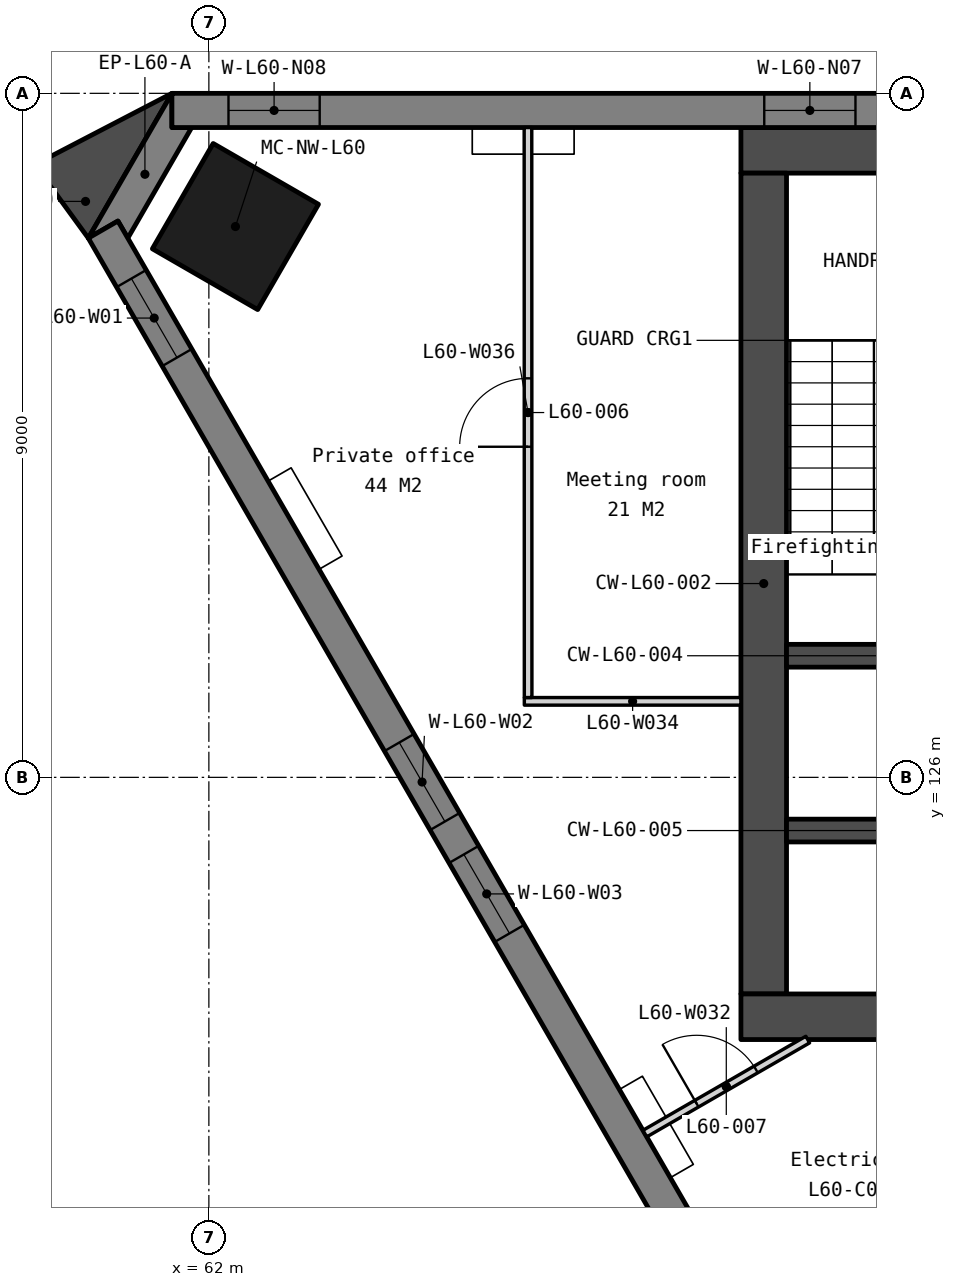
"""IFC4 building model, lengths in metres.
Left out: names, types, materials, properties, quantities, classifications, styles, units other than length and angle.
Written with IfcOpenShell. Run it as: python <this file> out.ifc"""

import sys

from ifc_helpers import new_model, si_unit, direction, frame, frame_2d, origin, origin_2d, place, context, subcontext, project, spatial, polyline, rectangle, outline, extrude, element, fill, save


model = new_model("IFC4")
c1 = context("Model", 3, precision=1e-05, world=origin(), true_north=direction((0.0, 1.0)))
c2 = subcontext(c1, "Body", "Model", "MODEL_VIEW")
j1 = project(units=[si_unit("LENGTHUNIT", "METRE"), si_unit("PLANEANGLEUNIT", "RADIAN")], contexts=[c1])
p1 = place(None, origin())
s1 = spatial("IfcSite", under=j1, at=p1, CompositionType="ELEMENT")
p2 = place(p1, origin())
s2 = spatial("IfcBuilding", under=s1, at=p2, CompositionType="ELEMENT")
p3 = place(p2, frame((0.0, 0.0, 246.5)))
s3 = spatial("IfcBuildingStorey", under=s2, at=p3, CompositionType="ELEMENT", Elevation=246.5)
p4 = place(p3, frame((62.349, 133.247, 0.0), z_axis=(0.0, 0.0, 1.0), x_axis=(-0.5, -0.866025403784, 0.0)))
e1 = element("IfcColumn", 1, at=p4, inside=s3, PredefinedType="COLUMN", context=c2, shape_type="SweptSolid", body=[
    extrude(rectangle(XDim=1.6, YDim=1.6, at=origin_2d()), origin(), (0.0, 0.0, 1.0), 3.9),
])
p5 = place(p3, frame((69.0, 134.25, 0.0), z_axis=(0.0, 0.0, 1.0), x_axis=(1.0, 0.0, 0.0)))
e2 = element("IfcWall", 2, at=p5, inside=s3, PredefinedType="SOLIDWALL", context=c2, shape_type="SweptSolid", body=[
    extrude(rectangle(XDim=22.0, YDim=0.6, at=frame_2d((11.0, 0.0))), origin(), (0.0, 0.0, 1.0), 3.75),
])
p6 = place(p3, frame((69.3, 133.95, 0.0), z_axis=(0.0, 0.0, 1.0), x_axis=(0.0, -1.0, 0.0)))
e3 = element("IfcWall", 3, at=p6, inside=s3, PredefinedType="SOLIDWALL", context=c2, shape_type="SweptSolid", body=[
    extrude(rectangle(XDim=10.8, YDim=0.6, at=frame_2d((5.4, 0.0))), origin(), (0.0, 0.0, 1.0), 3.75),
])
p7 = place(p3, frame((69.0, 122.85, 0.0), z_axis=(0.0, 0.0, 1.0), x_axis=(1.0, 0.0, 0.0)))
e4 = element("IfcWall", 4, at=p7, inside=s3, PredefinedType="SOLIDWALL", context=c2, shape_type="SweptSolid", body=[
    extrude(rectangle(XDim=22.0, YDim=0.6, at=frame_2d((11.0, 0.0))), origin(), (0.0, 0.0, 1.0), 3.75),
])
p8 = place(p7, frame((16.375, 0.0, 0.0)))
e5 = element("IfcOpeningElement", 5, at=p8, cuts=e4, PredefinedType="OPENING", context=c2, shape_type="SweptSolid", body=[
    extrude(rectangle(XDim=1.8, YDim=2.1, at=frame_2d((0.9, 1.05))), frame((0.0, 0.31, 0.0), z_axis=(0.0, -1.0, 0.0), x_axis=(1.0, 0.0, 0.0)), (0.0, 0.0, 1.0), 0.62),
])
p9 = place(p7, frame((3.825, 0.0, 0.0)))
e6 = element("IfcOpeningElement", 6, at=p9, cuts=e4, PredefinedType="OPENING", context=c2, shape_type="SweptSolid", body=[
    extrude(rectangle(XDim=1.8, YDim=2.1, at=frame_2d((0.9, 1.05))), frame((0.0, 0.31, 0.0), z_axis=(0.0, -1.0, 0.0), x_axis=(1.0, 0.0, 0.0)), (0.0, 0.0, 1.0), 0.62),
])
p10 = place(p7, frame((12.85, 0.0, 0.0)))
e7 = element("IfcOpeningElement", 7, at=p10, cuts=e4, PredefinedType="OPENING", context=c2, shape_type="SweptSolid", body=[
    extrude(rectangle(XDim=1.5, YDim=2.1, at=frame_2d((0.75, 1.05))), frame((0.0, 0.31, 0.0), z_axis=(0.0, -1.0, 0.0), x_axis=(1.0, 0.0, 0.0)), (0.0, 0.0, 1.0), 0.62),
])
for number, where, z_axis, x_axis in (
    (8, (69.6, 127.6, 0.0), (0.0, 0.0, 1.0), (1.0, 0.0, 0.0)),
    (9, (69.6, 125.3, 0.0), (0.0, 0.0, 1.0), (1.0, 0.0, 0.0)),
):
    element("IfcWall", number, at=place(p3, frame(where, z_axis=z_axis, x_axis=x_axis)), inside=s3, PredefinedType="SOLIDWALL", context=c2, shape_type="SweptSolid", body=[
        extrude(rectangle(XDim=2.55, YDim=0.3, at=frame_2d((1.275, 0.0))), origin(), (0.0, 0.0, 1.0), 3.75),
    ])
p11 = place(p3, frame((0.0, 0.0, -0.15)))
e10 = element("IfcWall", 10, at=p11, inside=s3, PredefinedType="SOLIDWALL", context=c2, shape_type="SweptSolid", body=[
    extrude(outline(polyline([(61.514, 135.0), (61.514, 134.55), (61.774, 134.55), (60.933, 133.095), (60.803, 133.32), (60.414, 133.095), (61.514, 135.0)])), origin(), (0.0, 0.0, 1.0), 3.9),
])
p12 = place(p3, frame((98.486, 134.775, -0.15), z_axis=(0.0, 0.0, 1.0), x_axis=(-1.0, 0.0, 0.0)))
e11 = element("IfcWall", 11, at=p12, inside=s3, PredefinedType="SOLIDWALL", context=c2, shape_type="SweptSolid", body=[
    extrude(outline(polyline([(36.972, 0.0), (36.972, 3.9), (0.0, 3.9), (0.0, 0.0), (36.972, 0.0)])), frame((0.0, 0.225, 0.0), z_axis=(0.0, -1.0, 0.0), x_axis=(1.0, 0.0, 0.0)), (0.0, 0.0, 1.0), 0.45),
])
p13 = place(p12, frame((0.744, 0.0, 0.95)))
e12 = element("IfcOpeningElement", 12, at=p13, cuts=e11, PredefinedType="OPENING", context=c2, shape_type="SweptSolid", body=[
    extrude(rectangle(XDim=1.2, YDim=2.2, at=frame_2d((0.6, 1.1))), frame((0.0, 0.235, 0.0), z_axis=(0.0, -1.0, 0.0), x_axis=(1.0, 0.0, 0.0)), (0.0, 0.0, 1.0), 0.47),
])
p14 = place(p12, frame((7.793, 0.0, 0.95)))
e13 = element("IfcOpeningElement", 13, at=p14, cuts=e11, PredefinedType="OPENING", context=c2, shape_type="SweptSolid", body=[
    extrude(rectangle(XDim=1.2, YDim=2.2, at=frame_2d((0.6, 1.1))), frame((0.0, 0.235, 0.0), z_axis=(0.0, -1.0, 0.0), x_axis=(1.0, 0.0, 0.0)), (0.0, 0.0, 1.0), 0.47),
])
p15 = place(p12, frame((9.493, 0.0, 0.95)))
e14 = element("IfcOpeningElement", 14, at=p15, cuts=e11, PredefinedType="OPENING", context=c2, shape_type="SweptSolid", body=[
    extrude(rectangle(XDim=1.2, YDim=2.2, at=frame_2d((0.6, 1.1))), frame((0.0, 0.235, 0.0), z_axis=(0.0, -1.0, 0.0), x_axis=(1.0, 0.0, 0.0)), (0.0, 0.0, 1.0), 0.47),
])
p16 = place(p12, frame((17.036, 0.0, 0.95)))
e15 = element("IfcOpeningElement", 15, at=p16, cuts=e11, PredefinedType="OPENING", context=c2, shape_type="SweptSolid", body=[
    extrude(rectangle(XDim=1.2, YDim=2.2, at=frame_2d((0.6, 1.1))), frame((0.0, 0.235, 0.0), z_axis=(0.0, -1.0, 0.0), x_axis=(1.0, 0.0, 0.0)), (0.0, 0.0, 1.0), 0.47),
])
p17 = place(p12, frame((18.736, 0.0, 0.95)))
e16 = element("IfcOpeningElement", 16, at=p17, cuts=e11, PredefinedType="OPENING", context=c2, shape_type="SweptSolid", body=[
    extrude(rectangle(XDim=1.2, YDim=2.2, at=frame_2d((0.6, 1.1))), frame((0.0, 0.235, 0.0), z_axis=(0.0, -1.0, 0.0), x_axis=(1.0, 0.0, 0.0)), (0.0, 0.0, 1.0), 0.47),
])
p18 = place(p12, frame((26.279, 0.0, 0.95)))
e17 = element("IfcOpeningElement", 17, at=p18, cuts=e11, PredefinedType="OPENING", context=c2, shape_type="SweptSolid", body=[
    extrude(rectangle(XDim=1.2, YDim=2.2, at=frame_2d((0.6, 1.1))), frame((0.0, 0.235, 0.0), z_axis=(0.0, -1.0, 0.0), x_axis=(1.0, 0.0, 0.0)), (0.0, 0.0, 1.0), 0.47),
])
p19 = place(p12, frame((27.979, 0.0, 0.95)))
e18 = element("IfcOpeningElement", 18, at=p19, cuts=e11, PredefinedType="OPENING", context=c2, shape_type="SweptSolid", body=[
    extrude(rectangle(XDim=1.2, YDim=2.2, at=frame_2d((0.6, 1.1))), frame((0.0, 0.235, 0.0), z_axis=(0.0, -1.0, 0.0), x_axis=(1.0, 0.0, 0.0)), (0.0, 0.0, 1.0), 0.47),
])
p20 = place(p12, frame((35.028, 0.0, 0.95)))
e19 = element("IfcOpeningElement", 19, at=p20, cuts=e11, PredefinedType="OPENING", context=c2, shape_type="SweptSolid", body=[
    extrude(rectangle(XDim=1.2, YDim=2.2, at=frame_2d((0.6, 1.1))), frame((0.0, 0.235, 0.0), z_axis=(0.0, -1.0, 0.0), x_axis=(1.0, 0.0, 0.0)), (0.0, 0.0, 1.0), 0.47),
])
p21 = place(p3, frame((60.609, 133.207, -0.15), z_axis=(0.0, 0.0, 1.0), x_axis=(0.500002536638, -0.866023939251, 0.0)))
e20 = element("IfcWall", 20, at=p21, inside=s3, PredefinedType="SOLIDWALL", context=c2, shape_type="SweptSolid", body=[
    extrude(outline(polyline([(36.972, 0.0), (36.972, 3.9), (0.0, 3.9), (0.0, 0.0), (36.972, 0.0)])), frame((0.0, 0.225, 0.0), z_axis=(0.0, -1.0, 0.0), x_axis=(1.0, 0.0, 0.0)), (0.0, 0.0, 1.0), 0.45),
])
p22 = place(p21, frame((0.744, 0.0, 0.95)))
e21 = element("IfcOpeningElement", 21, at=p22, cuts=e20, PredefinedType="OPENING", context=c2, shape_type="SweptSolid", body=[
    extrude(rectangle(XDim=1.2, YDim=2.2, at=frame_2d((0.6, 1.1))), frame((0.0, 0.235, 0.0), z_axis=(0.0, -1.0, 0.0), x_axis=(1.0, 0.0, 0.0)), (0.0, 0.0, 1.0), 0.47),
])
p23 = place(p21, frame((7.793, 0.0, 0.95)))
e22 = element("IfcOpeningElement", 22, at=p23, cuts=e20, PredefinedType="OPENING", context=c2, shape_type="SweptSolid", body=[
    extrude(rectangle(XDim=1.2, YDim=2.2, at=frame_2d((0.6, 1.1))), frame((0.0, 0.235, 0.0), z_axis=(0.0, -1.0, 0.0), x_axis=(1.0, 0.0, 0.0)), (0.0, 0.0, 1.0), 0.47),
])
p24 = place(p21, frame((9.493, 0.0, 0.95)))
e23 = element("IfcOpeningElement", 23, at=p24, cuts=e20, PredefinedType="OPENING", context=c2, shape_type="SweptSolid", body=[
    extrude(rectangle(XDim=1.2, YDim=2.2, at=frame_2d((0.6, 1.1))), frame((0.0, 0.235, 0.0), z_axis=(0.0, -1.0, 0.0), x_axis=(1.0, 0.0, 0.0)), (0.0, 0.0, 1.0), 0.47),
])
p25 = place(p21, frame((17.036, 0.0, 0.95)))
e24 = element("IfcOpeningElement", 24, at=p25, cuts=e20, PredefinedType="OPENING", context=c2, shape_type="SweptSolid", body=[
    extrude(rectangle(XDim=1.2, YDim=2.2, at=frame_2d((0.6, 1.1))), frame((0.0, 0.235, 0.0), z_axis=(0.0, -1.0, 0.0), x_axis=(1.0, 0.0, 0.0)), (0.0, 0.0, 1.0), 0.47),
])
p26 = place(p21, frame((18.736, 0.0, 0.95)))
e25 = element("IfcOpeningElement", 25, at=p26, cuts=e20, PredefinedType="OPENING", context=c2, shape_type="SweptSolid", body=[
    extrude(rectangle(XDim=1.2, YDim=2.2, at=frame_2d((0.6, 1.1))), frame((0.0, 0.235, 0.0), z_axis=(0.0, -1.0, 0.0), x_axis=(1.0, 0.0, 0.0)), (0.0, 0.0, 1.0), 0.47),
])
p27 = place(p21, frame((26.279, 0.0, 0.95)))
e26 = element("IfcOpeningElement", 26, at=p27, cuts=e20, PredefinedType="OPENING", context=c2, shape_type="SweptSolid", body=[
    extrude(rectangle(XDim=1.2, YDim=2.2, at=frame_2d((0.6, 1.1))), frame((0.0, 0.235, 0.0), z_axis=(0.0, -1.0, 0.0), x_axis=(1.0, 0.0, 0.0)), (0.0, 0.0, 1.0), 0.47),
])
p28 = place(p21, frame((27.979, 0.0, 0.95)))
e27 = element("IfcOpeningElement", 27, at=p28, cuts=e20, PredefinedType="OPENING", context=c2, shape_type="SweptSolid", body=[
    extrude(rectangle(XDim=1.2, YDim=2.2, at=frame_2d((0.6, 1.1))), frame((0.0, 0.235, 0.0), z_axis=(0.0, -1.0, 0.0), x_axis=(1.0, 0.0, 0.0)), (0.0, 0.0, 1.0), 0.47),
])
p29 = place(p21, frame((35.028, 0.0, 0.95)))
e28 = element("IfcOpeningElement", 28, at=p29, cuts=e20, PredefinedType="OPENING", context=c2, shape_type="SweptSolid", body=[
    extrude(rectangle(XDim=1.2, YDim=2.2, at=frame_2d((0.6, 1.1))), frame((0.0, 0.235, 0.0), z_axis=(0.0, -1.0, 0.0), x_axis=(1.0, 0.0, 0.0)), (0.0, 0.0, 1.0), 0.47),
])
p30 = place(p3, frame((0.0, 0.0, -0.15)))
e29 = element("IfcWall", 29, at=p30, inside=s3, PredefinedType="SOLIDWALL", context=c2, shape_type="SweptSolid", body=[
    extrude(outline(polyline([(61.514, 135.0), (59.71, 134.061), (60.414, 133.095), (61.514, 135.0)])), origin(), (0.0, 0.0, 1.0), 3.9),
])
p31 = place(p3, frame((67.736, 121.313, 0.0), z_axis=(0.0, 0.0, 1.0), x_axis=(0.866024577697, 0.500001430823, 0.0)))
e30 = element("IfcWall", 30, at=p31, inside=s3, PredefinedType="PARTITIONING", context=c2, shape_type="SweptSolid", body=[
    extrude(rectangle(XDim=2.475, YDim=0.1, at=frame_2d((1.237, 0.0))), origin(), (0.0, 0.0, 1.0), 3.75),
])
p32 = place(p31, frame((0.787, 0.0, 0.0)))
e31 = element("IfcOpeningElement", 31, at=p32, cuts=e30, PredefinedType="OPENING", context=c2, shape_type="SweptSolid", body=[
    extrude(rectangle(XDim=0.9, YDim=2.1, at=frame_2d((0.45, 1.05))), frame((0.0, 0.06, 0.0), z_axis=(0.0, -1.0, 0.0), x_axis=(1.0, 0.0, 0.0)), (0.0, 0.0, 1.0), 0.12),
])
p33 = place(p3, frame((66.15, 127.0, 0.0), z_axis=(0.0, 0.0, 1.0), x_axis=(1.0, 0.0, 0.0)))
e32 = element("IfcWall", 32, at=p33, inside=s3, PredefinedType="PARTITIONING", context=c2, shape_type="SweptSolid", body=[
    extrude(rectangle(XDim=2.85, YDim=0.1, at=frame_2d((1.425, 0.0))), origin(), (0.0, 0.0, 1.0), 3.75),
])
p34 = place(p3, frame((66.2, 127.05, 0.0), z_axis=(0.0, 0.0, 1.0), x_axis=(-0.000260425135, 0.999999966089, 0.0)))
e33 = element("IfcWall", 33, at=p34, inside=s3, PredefinedType="PARTITIONING", context=c2, shape_type="SweptSolid", body=[
    extrude(rectangle(XDim=7.5, YDim=0.1, at=frame_2d((3.75, 0.0))), origin(), (0.0, 0.0, 1.0), 3.28),
])
p35 = place(p34, frame((3.3, 0.0, 0.0)))
e34 = element("IfcOpeningElement", 34, at=p35, cuts=e33, PredefinedType="OPENING", context=c2, shape_type="SweptSolid", body=[
    extrude(rectangle(XDim=0.9, YDim=2.1, at=frame_2d((0.45, 1.05))), frame((0.0, 0.06, 0.0), z_axis=(0.0, -1.0, 0.0), x_axis=(1.0, 0.0, 0.0)), (0.0, 0.0, 1.0), 0.12),
])
p36 = place(p19, origin())
e35 = element("IfcWindow", 35, at=p36, inside=s3, PartitioningType="SINGLE_PANEL", PredefinedType="WINDOW", context=c2, shape_type="SweptSolid", body=[
    extrude(rectangle(XDim=1.2, YDim=2.2, at=frame_2d((0.6, 1.1))), frame((0.0, 0.03, 0.0), z_axis=(0.0, -1.0, 0.0), x_axis=(1.0, 0.0, 0.0)), (0.0, 0.0, 1.0), 0.06),
])
fill(e18, e35)
p37 = place(p20, origin())
e36 = element("IfcWindow", 36, at=p37, inside=s3, PartitioningType="SINGLE_PANEL", PredefinedType="WINDOW", context=c2, shape_type="SweptSolid", body=[
    extrude(rectangle(XDim=1.2, YDim=2.2, at=frame_2d((0.6, 1.1))), frame((0.0, 0.03, 0.0), z_axis=(0.0, -1.0, 0.0), x_axis=(1.0, 0.0, 0.0)), (0.0, 0.0, 1.0), 0.06),
])
fill(e19, e36)
p38 = place(p22, origin())
e37 = element("IfcWindow", 37, at=p38, inside=s3, PartitioningType="SINGLE_PANEL", PredefinedType="WINDOW", context=c2, shape_type="SweptSolid", body=[
    extrude(rectangle(XDim=1.2, YDim=2.2, at=frame_2d((0.6, 1.1))), frame((0.0, 0.03, 0.0), z_axis=(0.0, -1.0, 0.0), x_axis=(1.0, 0.0, 0.0)), (0.0, 0.0, 1.0), 0.06),
])
fill(e21, e37)
p39 = place(p23, origin())
e38 = element("IfcWindow", 38, at=p39, inside=s3, PartitioningType="SINGLE_PANEL", PredefinedType="WINDOW", context=c2, shape_type="SweptSolid", body=[
    extrude(rectangle(XDim=1.2, YDim=2.2, at=frame_2d((0.6, 1.1))), frame((0.0, 0.03, 0.0), z_axis=(0.0, -1.0, 0.0), x_axis=(1.0, 0.0, 0.0)), (0.0, 0.0, 1.0), 0.06),
])
fill(e22, e38)
p40 = place(p24, origin())
e39 = element("IfcWindow", 39, at=p40, inside=s3, PartitioningType="SINGLE_PANEL", PredefinedType="WINDOW", context=c2, shape_type="SweptSolid", body=[
    extrude(rectangle(XDim=1.2, YDim=2.2, at=frame_2d((0.6, 1.1))), frame((0.0, 0.03, 0.0), z_axis=(0.0, -1.0, 0.0), x_axis=(1.0, 0.0, 0.0)), (0.0, 0.0, 1.0), 0.06),
])
fill(e23, e39)
p41 = place(p35, origin())
e40 = element("IfcDoor", 40, at=p41, inside=s3, OperationType="SINGLE_SWING_LEFT", PredefinedType="DOOR", context=c2, shape_type="SweptSolid", body=[
    extrude(rectangle(XDim=0.9, YDim=2.1, at=frame_2d((0.45, 1.05))), frame((0.0, 0.025, 0.0), z_axis=(0.0, -1.0, 0.0), x_axis=(1.0, 0.0, 0.0)), (0.0, 0.0, 1.0), 0.05),
])
fill(e34, e40)
p42 = place(p32, origin())
e41 = element("IfcDoor", 41, at=p42, inside=s3, OperationType="SINGLE_SWING_LEFT", PredefinedType="DOOR", context=c2, shape_type="SweptSolid", body=[
    extrude(rectangle(XDim=0.9, YDim=2.1, at=frame_2d((0.45, 1.05))), frame((0.0, 0.025, 0.0), z_axis=(0.0, -1.0, 0.0), x_axis=(1.0, 0.0, 0.0)), (0.0, 0.0, 1.0), 0.05),
])
fill(e31, e41)
save(model, sys.argv[1])
